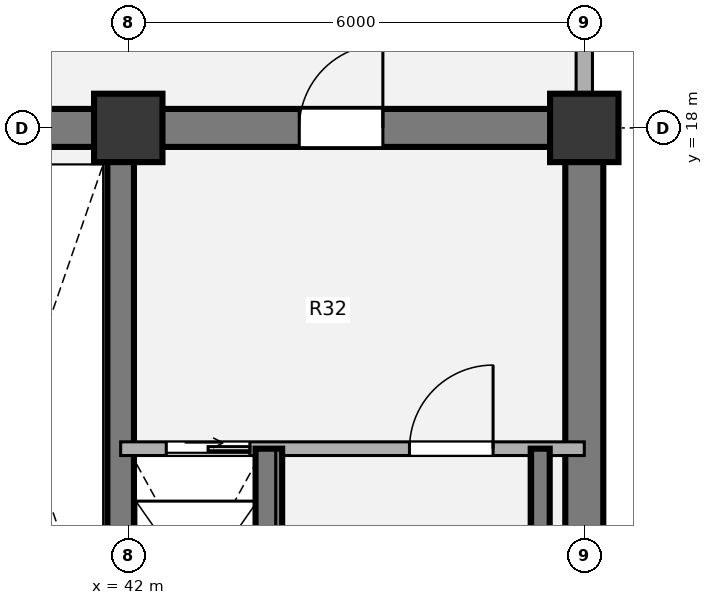
"""IFC4 building model, lengths in metres.
Left out: names, types, materials, properties, quantities, classifications, styles, units other than length and angle.
Written with IfcOpenShell. Run it as: python <this file> out.ifc"""

import sys

from ifc_helpers import new_model, si_unit, direction, frame, frame_2d, origin, origin_2d, place, context, subcontext, project, spatial, rectangle, extrude, source, transform, mapped, element, fill, save


model = new_model("IFC4")
c1 = context("Model", 3, precision=1e-05, world=origin(), true_north=direction((0.0, 1.0)))
c2 = subcontext(c1, "Body", "Model", "MODEL_VIEW")
j1 = project(units=[si_unit("LENGTHUNIT", "METRE"), si_unit("PLANEANGLEUNIT", "RADIAN")], contexts=[c1])
p1 = place(None, origin())
s1 = spatial("IfcSite", under=j1, at=p1, CompositionType="ELEMENT")
p2 = place(p1, origin())
s2 = spatial("IfcBuilding", under=s1, at=p2, CompositionType="ELEMENT")
p3 = place(p2, frame((0.0, 0.0, 131.4)))
s3 = spatial("IfcBuildingStorey", under=s2, at=p3, CompositionType="ELEMENT", Elevation=131.4)
m1 = source(origin(), c2, "Body", "SweptSolid", [
    extrude(rectangle(XDim=0.9, YDim=0.9, at=origin_2d()), origin(), (0.0, 0.0, 1.0), 3.78),
])
for number, where, z_axis, x_axis in (
    (1, (42.0, 18.0, 0.0), (0.0, 0.0, 1.0), (1.0, 0.0, 0.0)),
    (2, (48.0, 18.0, 0.0), (0.0, 0.0, 1.0), (1.0, 0.0, 0.0)),
):
    element("IfcColumn", number, at=place(p3, frame(where, z_axis=z_axis, x_axis=x_axis)), inside=s3, PredefinedType="COLUMN", context=c2, shape_type="MappedRepresentation", body=[
        mapped(m1, transform((0.0, 0.0, 0.0), x_axis=(1.0, 0.0, 0.0), y_axis=(0.0, 1.0, 0.0), z_axis=(0.0, 0.0, 1.0), scale=1.0)),
    ])
p4 = place(p3, frame((48.0, 18.0, 0.0), z_axis=(0.0, 0.0, 1.0), x_axis=(0.0, -1.0, 0.0)))
e3 = element("IfcWall", 3, at=p4, inside=s3, PredefinedType="SHEAR", context=c2, shape_type="SweptSolid", body=[
    extrude(rectangle(XDim=12.0, YDim=0.5, at=frame_2d((6.0, 0.0))), origin(), (0.0, 0.0, 1.0), 3.78),
])
p5 = place(p3, frame((38.8, 18.0, 0.0), z_axis=(0.0, 0.0, 1.0), x_axis=(1.0, 0.0, 0.0)))
e4 = element("IfcWall", 4, at=p5, inside=s3, PredefinedType="SHEAR", context=c2, shape_type="SweptSolid", body=[
    extrude(rectangle(XDim=9.45, YDim=0.5, at=frame_2d((4.725, 0.0))), origin(), (0.0, 0.0, 1.0), 3.78),
])
p6 = place(p5, frame((5.45, 0.0, 0.0)))
e5 = element("IfcOpeningElement", 5, at=p6, cuts=e4, PredefinedType="OPENING", context=c2, shape_type="SweptSolid", body=[
    extrude(rectangle(XDim=1.1, YDim=2.1, at=origin_2d()), frame((0.55, 0.26, 1.05), z_axis=(0.0, -1.0, 0.0), x_axis=(1.0, 0.0, 0.0)), (0.0, 0.0, 1.0), 0.52),
])
p7 = place(p3, frame((41.9, 18.0, 0.0), z_axis=(0.0, 0.0, 1.0), x_axis=(0.0, -1.0, 0.0)))
e6 = element("IfcWall", 6, at=p7, inside=s3, PredefinedType="SHEAR", context=c2, shape_type="SweptSolid", body=[
    extrude(rectangle(XDim=12.0, YDim=0.35, at=frame_2d((6.0, 0.0))), origin(), (0.0, 0.0, 1.0), 3.78),
])
p8 = place(p7, frame((10.08, 0.0, 0.0)))
e7 = element("IfcOpeningElement", 7, at=p8, cuts=e6, PredefinedType="OPENING", context=c2, shape_type="SweptSolid", body=[
    extrude(rectangle(XDim=1.3, YDim=2.1, at=origin_2d()), frame((0.65, 0.185, 1.05), z_axis=(0.0, -1.0, 0.0), x_axis=(1.0, 0.0, 0.0)), (0.0, 0.0, 1.0), 0.37),
])
p9 = place(p3, frame((48.0, 21.05, 0.0), z_axis=(0.0, 0.0, 1.0), x_axis=(0.0, -1.0, 0.0)))
e8 = element("IfcWall", 8, at=p9, inside=s3, PredefinedType="SOLIDWALL", context=c2, shape_type="SweptSolid", body=[
    extrude(rectangle(XDim=2.62, YDim=0.215, at=frame_2d((1.31, 0.0))), origin(), (0.0, 0.0, 1.0), 3.53),
])
p10 = place(p3, frame((41.9, 13.78, 0.0), z_axis=(0.0, 0.0, 1.0), x_axis=(1.0, 0.0, 0.0)))
e9 = element("IfcWall", 9, at=p10, inside=s3, PredefinedType="PARTITIONING", context=c2, shape_type="SweptSolid", body=[
    extrude(rectangle(XDim=6.1, YDim=0.18, at=frame_2d((3.05, 0.0))), origin(), (0.0, 0.0, 1.0), 3.5),
])
p11 = place(p10, frame((0.6, 0.0, 0.0)))
e10 = element("IfcOpeningElement", 10, at=p11, cuts=e9, PredefinedType="OPENING", context=c2, shape_type="SweptSolid", body=[
    extrude(rectangle(XDim=1.1, YDim=2.1, at=origin_2d()), frame((0.55, 0.1, 1.05), z_axis=(0.0, -1.0, 0.0), x_axis=(1.0, 0.0, 0.0)), (0.0, 0.0, 1.0), 0.2),
])
p12 = place(p10, frame((3.8, 0.0, 0.0)))
e11 = element("IfcOpeningElement", 11, at=p12, cuts=e9, PredefinedType="OPENING", context=c2, shape_type="SweptSolid", body=[
    extrude(rectangle(XDim=1.1, YDim=2.1, at=origin_2d()), frame((0.55, 0.1, 1.05), z_axis=(0.0, -1.0, 0.0), x_axis=(1.0, 0.0, 0.0)), (0.0, 0.0, 1.0), 0.2),
])
p13 = place(p3, frame((43.85, 6.0, 0.0), z_axis=(0.0, 0.0, 1.0), x_axis=(0.0, 1.0, 0.0)))
e12 = element("IfcWall", 12, at=p13, inside=s3, PredefinedType="SHEAR", context=c2, shape_type="SweptSolid", body=[
    extrude(rectangle(XDim=7.78, YDim=0.35, at=frame_2d((3.89, 0.0))), origin(), (0.0, 0.0, 1.0), 3.85),
])
p14 = place(p3, frame((47.42, 6.0, 0.0), z_axis=(0.0, 0.0, 1.0), x_axis=(0.0, 1.0, 0.0)))
e13 = element("IfcWall", 13, at=p14, inside=s3, PredefinedType="SHEAR", context=c2, shape_type="SweptSolid", body=[
    extrude(rectangle(XDim=7.78, YDim=0.25, at=frame_2d((3.89, 0.0))), origin(), (0.0, 0.0, 1.0), 3.85),
])
m2 = source(origin(), c2, "Body", "SweptSolid", [
    extrude(rectangle(XDim=1.1, YDim=2.1, at=origin_2d()), frame((0.55, 0.025, 1.05), z_axis=(0.0, -1.0, 0.0), x_axis=(1.0, 0.0, 0.0)), (0.0, 0.0, 1.0), 0.05),
])
p15 = place(p11, origin())
e14 = element("IfcDoor", 14, at=p15, inside=s3, OperationType="SLIDING_TO_RIGHT", PredefinedType="DOOR", context=c2, shape_type="MappedRepresentation", body=[
    mapped(m2, transform((0.0, 0.0, 0.0), x_axis=(1.0, 0.0, 0.0), y_axis=(0.0, 1.0, 0.0), z_axis=(0.0, 0.0, 1.0), scale=1.0)),
])
fill(e10, e14)
m3 = source(origin(), c2, "Body", "SweptSolid", [
    extrude(rectangle(XDim=1.1, YDim=2.1, at=origin_2d()), frame((0.55, 0.025, 1.05), z_axis=(0.0, -1.0, 0.0), x_axis=(1.0, 0.0, 0.0)), (0.0, 0.0, 1.0), 0.05),
])
p16 = place(p12, origin())
e15 = element("IfcDoor", 15, at=p16, inside=s3, OperationType="SINGLE_SWING_RIGHT", PredefinedType="DOOR", context=c2, shape_type="MappedRepresentation", body=[
    mapped(m3, transform((0.0, 0.0, 0.0), x_axis=(1.0, 0.0, 0.0), y_axis=(0.0, 1.0, 0.0), z_axis=(0.0, 0.0, 1.0), scale=1.0)),
])
fill(e11, e15)
m4 = source(origin(), c2, "Body", "SweptSolid", [
    extrude(rectangle(XDim=1.1, YDim=2.1, at=origin_2d()), frame((0.55, 0.025, 1.05), z_axis=(0.0, -1.0, 0.0), x_axis=(1.0, 0.0, 0.0)), (0.0, 0.0, 1.0), 0.05),
])
p17 = place(p6, origin())
e16 = element("IfcDoor", 16, at=p17, inside=s3, OperationType="SINGLE_SWING_RIGHT", PredefinedType="DOOR", context=c2, shape_type="MappedRepresentation", body=[
    mapped(m4, transform((0.0, 0.0, 0.0), x_axis=(1.0, 0.0, 0.0), y_axis=(0.0, 1.0, 0.0), z_axis=(0.0, 0.0, 1.0), scale=1.0)),
])
fill(e5, e16)
save(model, sys.argv[1])
